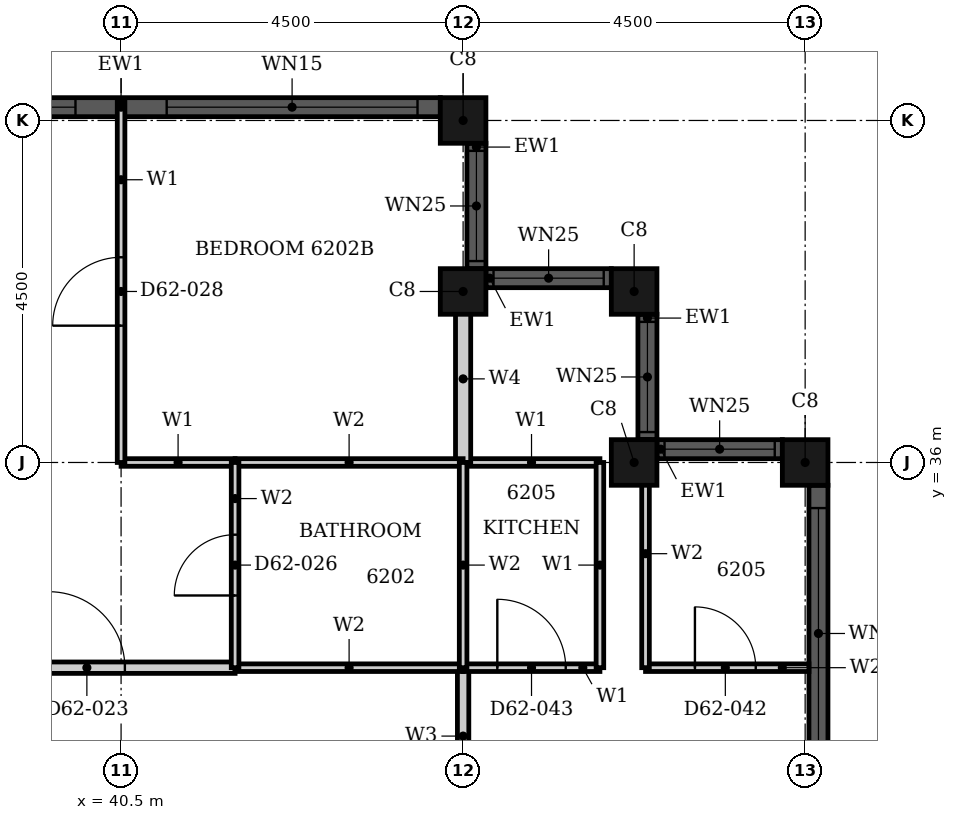
"""IFC4 building model, lengths in metres.
Left out: names, types, materials, properties, quantities, classifications, styles, units other than length and angle.
Written with IfcOpenShell. Run it as: python <this file> out.ifc"""

import sys

from ifc_helpers import new_model, si_unit, direction, frame, frame_2d, origin, origin_2d, place, context, subcontext, project, spatial, rectangle, hollow_rectangle, extrude, element, fill, save


model = new_model("IFC4")
c1 = context("Model", 3, precision=1e-05, world=origin(), true_north=direction((0.0, 1.0)))
c2 = subcontext(c1, "Body", "Model", "MODEL_VIEW")
j1 = project(units=[si_unit("LENGTHUNIT", "METRE"), si_unit("PLANEANGLEUNIT", "RADIAN")], contexts=[c1])
p1 = place(None, origin())
s1 = spatial("IfcSite", under=j1, at=p1, CompositionType="ELEMENT")
p2 = place(p1, origin())
s2 = spatial("IfcBuilding", under=s1, at=p2, CompositionType="ELEMENT")
p3 = place(p2, frame((0.0, 0.0, 245.3)))
s3 = spatial("IfcBuildingStorey", under=s2, at=p3, CompositionType="ELEMENT", Elevation=245.3)
for number, where, z_axis, x_axis in (
    (1, (49.5, 36.0, 0.0), (0.0, 0.0, 1.0), (1.0, 0.0, 0.0)),
    (2, (47.25, 36.0, 0.0), (0.0, 0.0, 1.0), (1.0, 0.0, 0.0)),
    (3, (47.25, 38.25, 0.0), (0.0, 0.0, 1.0), (1.0, 0.0, 0.0)),
    (4, (45.0, 38.25, 0.0), (0.0, 0.0, 1.0), (1.0, 0.0, 0.0)),
    (5, (45.0, 40.5, 0.0), (0.0, 0.0, 1.0), (1.0, 0.0, 0.0)),
):
    element("IfcColumn", number, at=place(p3, frame(where, z_axis=z_axis, x_axis=x_axis)), inside=s3, PredefinedType="COLUMN", context=c2, shape_type="SweptSolid", body=[
        extrude(hollow_rectangle(XDim=0.6, YDim=0.6, WallThickness=0.02, at=origin_2d()), origin(), (0.0, 0.0, 1.0), 3.7),
    ])
p4 = place(p3, frame((49.675, 27.3, 0.0), z_axis=(0.0, 0.0, 1.0), x_axis=(0.0, 1.0, 0.0)))
e6 = element("IfcWall", 6, at=p4, inside=s3, PredefinedType="SOLIDWALL", context=c2, shape_type="SweptSolid", body=[
    extrude(rectangle(XDim=8.4, YDim=0.25, at=frame_2d((4.2, 0.0))), origin(), (0.0, 0.0, 1.0), 3.7),
])
p5 = place(p4, frame((0.3, 0.0, 0.45)))
e7 = element("IfcOpeningElement", 7, at=p5, cuts=e6, PredefinedType="OPENING", context=c2, shape_type="SweptSolid", body=[
    extrude(rectangle(XDim=3.3, YDim=2.3, at=frame_2d((1.65, 1.15))), frame((0.0, 0.135, 0.0), z_axis=(0.0, -1.0, 0.0), x_axis=(1.0, 0.0, 0.0)), (0.0, 0.0, 1.0), 0.27),
])
p6 = place(p4, frame((4.8, 0.0, 0.45)))
e8 = element("IfcOpeningElement", 8, at=p6, cuts=e6, PredefinedType="OPENING", context=c2, shape_type="SweptSolid", body=[
    extrude(rectangle(XDim=3.3, YDim=2.3, at=frame_2d((1.65, 1.15))), frame((0.0, 0.135, 0.0), z_axis=(0.0, -1.0, 0.0), x_axis=(1.0, 0.0, 0.0)), (0.0, 0.0, 1.0), 0.27),
])
p7 = place(p3, frame((49.2, 36.175, 0.0), z_axis=(0.0, 0.0, 1.0), x_axis=(-1.0, 0.0, 0.0)))
e9 = element("IfcWall", 9, at=p7, inside=s3, PredefinedType="SOLIDWALL", context=c2, shape_type="SweptSolid", body=[
    extrude(rectangle(XDim=1.65, YDim=0.25, at=frame_2d((0.825, 0.0))), origin(), (0.0, 0.0, 1.0), 3.7),
])
p8 = place(p7, frame((0.1, 0.0, 0.9)))
e10 = element("IfcOpeningElement", 10, at=p8, cuts=e9, PredefinedType="OPENING", context=c2, shape_type="SweptSolid", body=[
    extrude(rectangle(XDim=1.45, YDim=1.85, at=frame_2d((0.725, 0.925))), frame((0.0, 0.135, 0.0), z_axis=(0.0, -1.0, 0.0), x_axis=(1.0, 0.0, 0.0)), (0.0, 0.0, 1.0), 0.27),
])
p9 = place(p3, frame((47.425, 36.3, 0.0), z_axis=(0.0, 0.0, 1.0), x_axis=(0.0, 1.0, 0.0)))
e11 = element("IfcWall", 11, at=p9, inside=s3, PredefinedType="SOLIDWALL", context=c2, shape_type="SweptSolid", body=[
    extrude(rectangle(XDim=1.65, YDim=0.25, at=frame_2d((0.825, 0.0))), origin(), (0.0, 0.0, 1.0), 3.7),
])
p10 = place(p9, frame((0.1, 0.0, 0.9)))
e12 = element("IfcOpeningElement", 12, at=p10, cuts=e11, PredefinedType="OPENING", context=c2, shape_type="SweptSolid", body=[
    extrude(rectangle(XDim=1.45, YDim=1.85, at=frame_2d((0.725, 0.925))), frame((0.0, 0.135, 0.0), z_axis=(0.0, -1.0, 0.0), x_axis=(1.0, 0.0, 0.0)), (0.0, 0.0, 1.0), 0.27),
])
p11 = place(p3, frame((46.95, 38.425, 0.0), z_axis=(0.0, 0.0, 1.0), x_axis=(-1.0, 0.0, 0.0)))
e13 = element("IfcWall", 13, at=p11, inside=s3, PredefinedType="SOLIDWALL", context=c2, shape_type="SweptSolid", body=[
    extrude(rectangle(XDim=1.65, YDim=0.25, at=frame_2d((0.825, 0.0))), origin(), (0.0, 0.0, 1.0), 3.7),
])
p12 = place(p11, frame((0.1, 0.0, 0.9)))
e14 = element("IfcOpeningElement", 14, at=p12, cuts=e13, PredefinedType="OPENING", context=c2, shape_type="SweptSolid", body=[
    extrude(rectangle(XDim=1.45, YDim=1.85, at=frame_2d((0.725, 0.925))), frame((0.0, 0.135, 0.0), z_axis=(0.0, -1.0, 0.0), x_axis=(1.0, 0.0, 0.0)), (0.0, 0.0, 1.0), 0.27),
])
p13 = place(p3, frame((45.175, 38.55, 0.0), z_axis=(0.0, 0.0, 1.0), x_axis=(0.0, 1.0, 0.0)))
e15 = element("IfcWall", 15, at=p13, inside=s3, PredefinedType="SOLIDWALL", context=c2, shape_type="SweptSolid", body=[
    extrude(rectangle(XDim=1.65, YDim=0.25, at=frame_2d((0.825, 0.0))), origin(), (0.0, 0.0, 1.0), 3.7),
])
p14 = place(p13, frame((0.1, 0.0, 0.9)))
e16 = element("IfcOpeningElement", 16, at=p14, cuts=e15, PredefinedType="OPENING", context=c2, shape_type="SweptSolid", body=[
    extrude(rectangle(XDim=1.45, YDim=1.85, at=frame_2d((0.725, 0.925))), frame((0.0, 0.135, 0.0), z_axis=(0.0, -1.0, 0.0), x_axis=(1.0, 0.0, 0.0)), (0.0, 0.0, 1.0), 0.27),
])
p15 = place(p3, frame((44.7, 40.675, 0.0), z_axis=(0.0, 0.0, 1.0), x_axis=(-1.0, 0.0, 0.0)))
e17 = element("IfcWall", 17, at=p15, inside=s3, PredefinedType="SOLIDWALL", context=c2, shape_type="SweptSolid", body=[
    extrude(rectangle(XDim=8.4, YDim=0.25, at=frame_2d((4.2, 0.0))), origin(), (0.0, 0.0, 1.0), 3.7),
])
p16 = place(p15, frame((0.3, 0.0, 0.45)))
e18 = element("IfcOpeningElement", 18, at=p16, cuts=e17, PredefinedType="OPENING", context=c2, shape_type="SweptSolid", body=[
    extrude(rectangle(XDim=3.3, YDim=2.3, at=frame_2d((1.65, 1.15))), frame((0.0, 0.135, 0.0), z_axis=(0.0, -1.0, 0.0), x_axis=(1.0, 0.0, 0.0)), (0.0, 0.0, 1.0), 0.27),
])
p17 = place(p15, frame((4.8, 0.0, 0.45)))
e19 = element("IfcOpeningElement", 19, at=p17, cuts=e17, PredefinedType="OPENING", context=c2, shape_type="SweptSolid", body=[
    extrude(rectangle(XDim=3.3, YDim=2.3, at=frame_2d((1.65, 1.15))), frame((0.0, 0.135, 0.0), z_axis=(0.0, -1.0, 0.0), x_axis=(1.0, 0.0, 0.0)), (0.0, 0.0, 1.0), 0.27),
])
p18 = place(p3, frame((35.1, 33.3, 0.0), z_axis=(0.0, 0.0, 1.0), x_axis=(1.0, 0.0, 0.0)))
e20 = element("IfcWall", 20, at=p18, inside=s3, PredefinedType="PARTITIONING", context=c2, shape_type="SweptSolid", body=[
    extrude(rectangle(XDim=6.9, YDim=0.15, at=frame_2d((3.45, 0.0))), origin(), (0.0, 0.0, 1.0), 3.4),
])
p19 = place(p18, frame((4.45, 0.0, 0.0)))
e21 = element("IfcOpeningElement", 21, at=p19, cuts=e20, PredefinedType="OPENING", context=c2, shape_type="SweptSolid", body=[
    extrude(rectangle(XDim=1.0, YDim=2.2, at=frame_2d((0.5, 1.1))), frame((0.0, 0.085, 0.0), z_axis=(0.0, -1.0, 0.0), x_axis=(1.0, 0.0, 0.0)), (0.0, 0.0, 1.0), 0.17),
])
p20 = place(p3, frame((45.0, 31.5, 0.0), z_axis=(0.0, 0.0, 1.0), x_axis=(0.0, 1.0, 0.0)))
e22 = element("IfcWall", 22, at=p20, inside=s3, PredefinedType="PARTITIONING", context=c2, shape_type="SweptSolid", body=[
    extrude(rectangle(XDim=1.8, YDim=0.15, at=frame_2d((0.9, 0.0))), origin(), (0.0, 0.0, 1.0), 3.4),
])
p21 = place(p3, frame((45.0, 33.3, 0.0), z_axis=(0.0, 0.0, 1.0), x_axis=(1.0, 0.0, 0.0)))
e23 = element("IfcWall", 23, at=p21, inside=s3, PredefinedType="PARTITIONING", context=c2, shape_type="SweptSolid", body=[
    extrude(rectangle(XDim=1.8, YDim=0.1, at=frame_2d((0.9, 0.0))), origin(), (0.0, 0.0, 1.0), 3.4),
])
p22 = place(p21, frame((0.45, 0.0, 0.0)))
e24 = element("IfcOpeningElement", 24, at=p22, cuts=e23, PredefinedType="OPENING", context=c2, shape_type="SweptSolid", body=[
    extrude(rectangle(XDim=0.9, YDim=2.1, at=frame_2d((0.45, 1.05))), frame((0.0, 0.06, 0.0), z_axis=(0.0, -1.0, 0.0), x_axis=(1.0, 0.0, 0.0)), (0.0, 0.0, 1.0), 0.12),
])
p23 = place(p3, frame((40.5, 36.0, 0.0), z_axis=(0.0, 0.0, 1.0), x_axis=(1.0, 0.0, 0.0)))
e25 = element("IfcWall", 25, at=p23, inside=s3, PredefinedType="PARTITIONING", context=c2, shape_type="SweptSolid", body=[
    extrude(rectangle(XDim=1.5, YDim=0.1, at=frame_2d((0.75, 0.0))), origin(), (0.0, 0.0, 1.0), 3.4),
])
p24 = place(p3, frame((45.0, 36.0, 0.0), z_axis=(0.0, 0.0, 1.0), x_axis=(1.0, 0.0, 0.0)))
e26 = element("IfcWall", 26, at=p24, inside=s3, PredefinedType="PARTITIONING", context=c2, shape_type="SweptSolid", body=[
    extrude(rectangle(XDim=1.8, YDim=0.1, at=frame_2d((0.9, 0.0))), origin(), (0.0, 0.0, 1.0), 3.4),
])
p25 = place(p3, frame((40.5, 36.0, 0.0), z_axis=(0.0, 0.0, 1.0), x_axis=(0.0, 1.0, 0.0)))
e27 = element("IfcWall", 27, at=p25, inside=s3, PredefinedType="PARTITIONING", context=c2, shape_type="SweptSolid", body=[
    extrude(rectangle(XDim=4.74, YDim=0.1, at=frame_2d((2.37, 0.0))), origin(), (0.0, 0.0, 1.0), 3.4),
])
p26 = place(p25, frame((1.8, 0.0, 0.0)))
e28 = element("IfcOpeningElement", 28, at=p26, cuts=e27, PredefinedType="OPENING", context=c2, shape_type="SweptSolid", body=[
    extrude(rectangle(XDim=0.9, YDim=2.1, at=frame_2d((0.45, 1.05))), frame((0.0, 0.06, 0.0), z_axis=(0.0, -1.0, 0.0), x_axis=(1.0, 0.0, 0.0)), (0.0, 0.0, 1.0), 0.12),
])
p27 = place(p3, frame((46.8, 33.3, 0.0), z_axis=(0.0, 0.0, 1.0), x_axis=(0.0, 1.0, 0.0)))
e29 = element("IfcWall", 29, at=p27, inside=s3, PredefinedType="PARTITIONING", context=c2, shape_type="SweptSolid", body=[
    extrude(rectangle(XDim=2.7, YDim=0.1, at=frame_2d((1.35, 0.0))), origin(), (0.0, 0.0, 1.0), 3.4),
])
p28 = place(p3, frame((45.0, 36.0, 0.0), z_axis=(0.0, 0.0, 1.0), x_axis=(0.0, 1.0, 0.0)))
e30 = element("IfcWall", 30, at=p28, inside=s3, PredefinedType="PARTITIONING", context=c2, shape_type="SweptSolid", body=[
    extrude(rectangle(XDim=2.2, YDim=0.2, at=frame_2d((1.1, 0.0))), origin(), (0.0, 0.0, 1.0), 3.4),
])
p29 = place(p3, frame((42.0, 33.3, 0.0), z_axis=(0.0, 0.0, 1.0), x_axis=(1.0, 0.0, 0.0)))
e31 = element("IfcWall", 31, at=p29, inside=s3, PredefinedType="PARTITIONING", context=c2, shape_type="SweptSolid", body=[
    extrude(rectangle(XDim=3.0, YDim=0.1, at=frame_2d((1.5, 0.0))), origin(), (0.0, 0.0, 1.0), 3.4),
])
p30 = place(p3, frame((47.4, 33.3, 0.0), z_axis=(0.0, 0.0, 1.0), x_axis=(1.0, 0.0, 0.0)))
e32 = element("IfcWall", 32, at=p30, inside=s3, PredefinedType="PARTITIONING", context=c2, shape_type="SweptSolid", body=[
    extrude(rectangle(XDim=2.15, YDim=0.1, at=frame_2d((1.075, 0.0))), origin(), (0.0, 0.0, 1.0), 3.4),
])
p31 = place(p30, frame((0.65, 0.0, 0.0)))
e33 = element("IfcOpeningElement", 33, at=p31, cuts=e32, PredefinedType="OPENING", context=c2, shape_type="SweptSolid", body=[
    extrude(rectangle(XDim=0.8, YDim=2.1, at=frame_2d((0.4, 1.05))), frame((0.0, 0.06, 0.0), z_axis=(0.0, -1.0, 0.0), x_axis=(1.0, 0.0, 0.0)), (0.0, 0.0, 1.0), 0.12),
])
p32 = place(p3, frame((42.0, 36.0, 0.0), z_axis=(0.0, 0.0, 1.0), x_axis=(1.0, 0.0, 0.0)))
e34 = element("IfcWall", 34, at=p32, inside=s3, PredefinedType="PARTITIONING", context=c2, shape_type="SweptSolid", body=[
    extrude(rectangle(XDim=3.0, YDim=0.1, at=frame_2d((1.5, 0.0))), origin(), (0.0, 0.0, 1.0), 3.4),
])
p33 = place(p3, frame((42.0, 33.3, 0.0), z_axis=(0.0, 0.0, 1.0), x_axis=(0.0, 1.0, 0.0)))
e35 = element("IfcWall", 35, at=p33, inside=s3, PredefinedType="PARTITIONING", context=c2, shape_type="SweptSolid", body=[
    extrude(rectangle(XDim=2.7, YDim=0.1, at=frame_2d((1.35, 0.0))), origin(), (0.0, 0.0, 1.0), 3.4),
])
p34 = place(p33, frame((0.95, 0.0, 0.0)))
e36 = element("IfcOpeningElement", 36, at=p34, cuts=e35, PredefinedType="OPENING", context=c2, shape_type="SweptSolid", body=[
    extrude(rectangle(XDim=0.8, YDim=2.1, at=frame_2d((0.4, 1.05))), frame((0.0, 0.06, 0.0), z_axis=(0.0, -1.0, 0.0), x_axis=(1.0, 0.0, 0.0)), (0.0, 0.0, 1.0), 0.12),
])
p35 = place(p3, frame((45.0, 33.3, 0.0), z_axis=(0.0, 0.0, 1.0), x_axis=(0.0, 1.0, 0.0)))
e37 = element("IfcWall", 37, at=p35, inside=s3, PredefinedType="PARTITIONING", context=c2, shape_type="SweptSolid", body=[
    extrude(rectangle(XDim=2.7, YDim=0.1, at=frame_2d((1.35, 0.0))), origin(), (0.0, 0.0, 1.0), 3.4),
])
p36 = place(p3, frame((47.4, 33.3, 0.0), z_axis=(0.0, 0.0, 1.0), x_axis=(0.0, 1.0, 0.0)))
e38 = element("IfcWall", 38, at=p36, inside=s3, PredefinedType="PARTITIONING", context=c2, shape_type="SweptSolid", body=[
    extrude(rectangle(XDim=3.0, YDim=0.1, at=frame_2d((1.5, 0.0))), origin(), (0.0, 0.0, 1.0), 3.4),
])
p37 = place(p6, origin())
e39 = element("IfcWindow", 39, at=p37, inside=s3, PartitioningType="SINGLE_PANEL", PredefinedType="WINDOW", context=c2, shape_type="SweptSolid", body=[
    extrude(rectangle(XDim=3.3, YDim=2.3, at=frame_2d((1.65, 1.15))), frame((0.0, 0.03, 0.0), z_axis=(0.0, -1.0, 0.0), x_axis=(1.0, 0.0, 0.0)), (0.0, 0.0, 1.0), 0.06),
])
fill(e8, e39)
p38 = place(p8, origin())
e40 = element("IfcWindow", 40, at=p38, inside=s3, PartitioningType="SINGLE_PANEL", PredefinedType="WINDOW", context=c2, shape_type="SweptSolid", body=[
    extrude(rectangle(XDim=1.45, YDim=1.85, at=frame_2d((0.725, 0.925))), frame((0.0, 0.03, 0.0), z_axis=(0.0, -1.0, 0.0), x_axis=(1.0, 0.0, 0.0)), (0.0, 0.0, 1.0), 0.06),
])
fill(e10, e40)
p39 = place(p10, origin())
e41 = element("IfcWindow", 41, at=p39, inside=s3, PartitioningType="SINGLE_PANEL", PredefinedType="WINDOW", context=c2, shape_type="SweptSolid", body=[
    extrude(rectangle(XDim=1.45, YDim=1.85, at=frame_2d((0.725, 0.925))), frame((0.0, 0.03, 0.0), z_axis=(0.0, -1.0, 0.0), x_axis=(1.0, 0.0, 0.0)), (0.0, 0.0, 1.0), 0.06),
])
fill(e12, e41)
p40 = place(p12, origin())
e42 = element("IfcWindow", 42, at=p40, inside=s3, PartitioningType="SINGLE_PANEL", PredefinedType="WINDOW", context=c2, shape_type="SweptSolid", body=[
    extrude(rectangle(XDim=1.45, YDim=1.85, at=frame_2d((0.725, 0.925))), frame((0.0, 0.03, 0.0), z_axis=(0.0, -1.0, 0.0), x_axis=(1.0, 0.0, 0.0)), (0.0, 0.0, 1.0), 0.06),
])
fill(e14, e42)
p41 = place(p14, origin())
e43 = element("IfcWindow", 43, at=p41, inside=s3, PartitioningType="SINGLE_PANEL", PredefinedType="WINDOW", context=c2, shape_type="SweptSolid", body=[
    extrude(rectangle(XDim=1.45, YDim=1.85, at=frame_2d((0.725, 0.925))), frame((0.0, 0.03, 0.0), z_axis=(0.0, -1.0, 0.0), x_axis=(1.0, 0.0, 0.0)), (0.0, 0.0, 1.0), 0.06),
])
fill(e16, e43)
p42 = place(p16, origin())
e44 = element("IfcWindow", 44, at=p42, inside=s3, PartitioningType="SINGLE_PANEL", PredefinedType="WINDOW", context=c2, shape_type="SweptSolid", body=[
    extrude(rectangle(XDim=3.3, YDim=2.3, at=frame_2d((1.65, 1.15))), frame((0.0, 0.03, 0.0), z_axis=(0.0, -1.0, 0.0), x_axis=(1.0, 0.0, 0.0)), (0.0, 0.0, 1.0), 0.06),
])
fill(e18, e44)
p43 = place(p17, origin())
e45 = element("IfcWindow", 45, at=p43, inside=s3, PartitioningType="SINGLE_PANEL", PredefinedType="WINDOW", context=c2, shape_type="SweptSolid", body=[
    extrude(rectangle(XDim=3.3, YDim=2.3, at=frame_2d((1.65, 1.15))), frame((0.0, 0.03, 0.0), z_axis=(0.0, -1.0, 0.0), x_axis=(1.0, 0.0, 0.0)), (0.0, 0.0, 1.0), 0.06),
])
fill(e19, e45)
p44 = place(p19, origin())
e46 = element("IfcDoor", 46, at=p44, inside=s3, OperationType="SINGLE_SWING_RIGHT", PredefinedType="DOOR", context=c2, shape_type="SweptSolid", body=[
    extrude(rectangle(XDim=1.0, YDim=2.2, at=frame_2d((0.5, 1.1))), frame((0.0, 0.025, 0.0), z_axis=(0.0, -1.0, 0.0), x_axis=(1.0, 0.0, 0.0)), (0.0, 0.0, 1.0), 0.05),
])
fill(e21, e46)
p45 = place(p34, origin())
e47 = element("IfcDoor", 47, at=p45, inside=s3, OperationType="SINGLE_SWING_RIGHT", PredefinedType="DOOR", context=c2, shape_type="SweptSolid", body=[
    extrude(rectangle(XDim=0.8, YDim=2.1, at=frame_2d((0.4, 1.05))), frame((0.0, 0.025, 0.0), z_axis=(0.0, -1.0, 0.0), x_axis=(1.0, 0.0, 0.0)), (0.0, 0.0, 1.0), 0.05),
])
fill(e36, e47)
p46 = place(p26, origin())
e48 = element("IfcDoor", 48, at=p46, inside=s3, OperationType="SINGLE_SWING_LEFT", PredefinedType="DOOR", context=c2, shape_type="SweptSolid", body=[
    extrude(rectangle(XDim=0.9, YDim=2.1, at=frame_2d((0.45, 1.05))), frame((0.0, 0.025, 0.0), z_axis=(0.0, -1.0, 0.0), x_axis=(1.0, 0.0, 0.0)), (0.0, 0.0, 1.0), 0.05),
])
fill(e28, e48)
p47 = place(p31, origin())
e49 = element("IfcDoor", 49, at=p47, inside=s3, OperationType="SINGLE_SWING_LEFT", PredefinedType="DOOR", context=c2, shape_type="SweptSolid", body=[
    extrude(rectangle(XDim=0.8, YDim=2.1, at=frame_2d((0.4, 1.05))), frame((0.0, 0.025, 0.0), z_axis=(0.0, -1.0, 0.0), x_axis=(1.0, 0.0, 0.0)), (0.0, 0.0, 1.0), 0.05),
])
fill(e33, e49)
p48 = place(p22, origin())
e50 = element("IfcDoor", 50, at=p48, inside=s3, OperationType="SINGLE_SWING_RIGHT", PredefinedType="DOOR", context=c2, shape_type="SweptSolid", body=[
    extrude(rectangle(XDim=0.9, YDim=2.1, at=frame_2d((0.45, 1.05))), frame((0.0, 0.025, 0.0), z_axis=(0.0, -1.0, 0.0), x_axis=(1.0, 0.0, 0.0)), (0.0, 0.0, 1.0), 0.05),
])
fill(e24, e50)
save(model, sys.argv[1])
